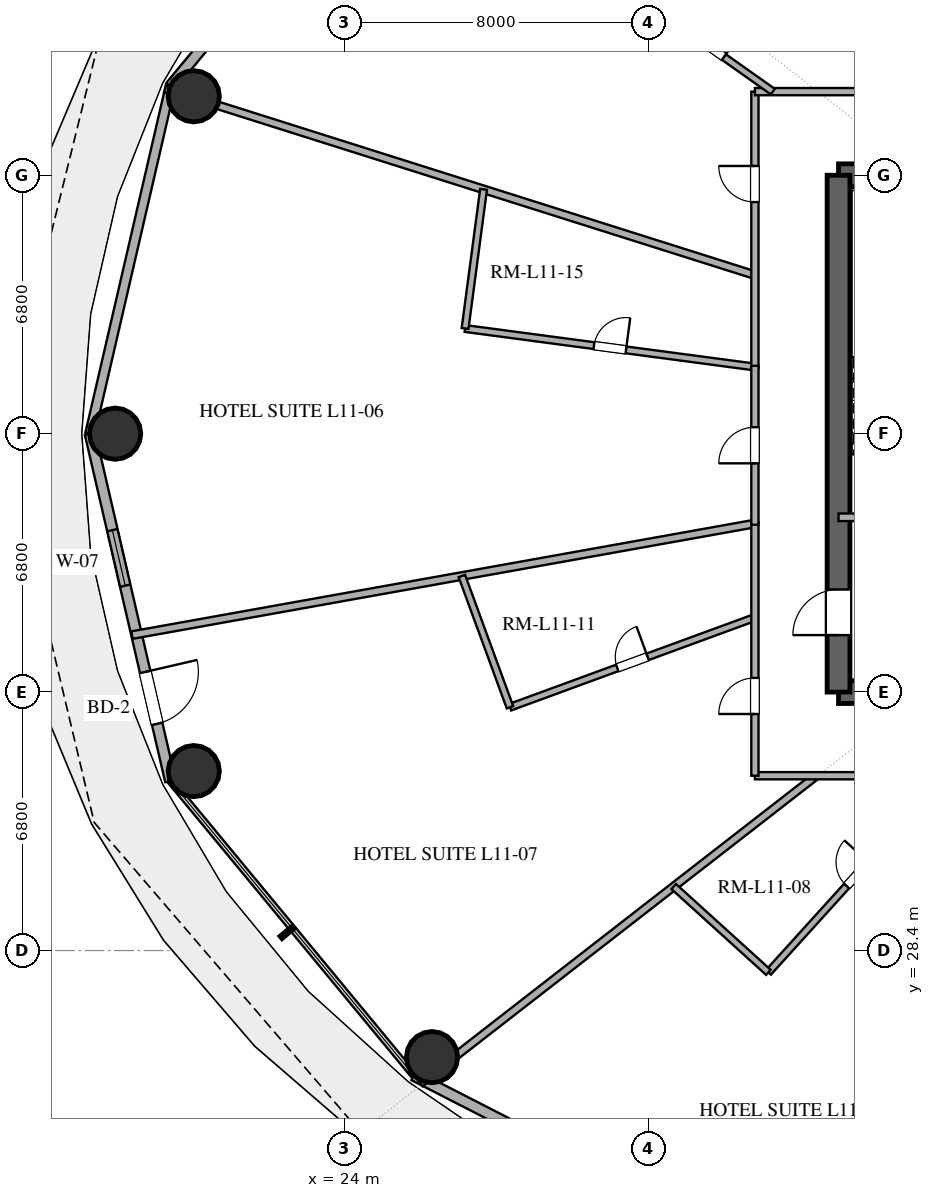
"""IFC4 building model, lengths in metres.
Left out: names, types, materials, properties, quantities, classifications, styles, units other than length and angle.
Written with IfcOpenShell. Run it as: python <this file> out.ifc"""

import sys

from ifc_helpers import new_model, si_unit, direction, frame, frame_2d, origin, origin_2d, place, context, subcontext, project, spatial, rectangle, hollow_circle, extrude, element, fill, save


model = new_model("IFC4")
c1 = context("Model", 3, precision=1e-05, world=origin(), true_north=direction((0.0, 1.0)))
c2 = subcontext(c1, "Body", "Model", "MODEL_VIEW")
j1 = project(units=[si_unit("LENGTHUNIT", "METRE"), si_unit("PLANEANGLEUNIT", "RADIAN")], contexts=[c1])
p1 = place(None, origin())
s1 = spatial("IfcSite", under=j1, at=p1, CompositionType="ELEMENT")
p2 = place(p1, origin())
s2 = spatial("IfcBuilding", under=s1, at=p2, CompositionType="ELEMENT")
p3 = place(p2, frame((0.0, 0.0, 49.8)))
s3 = spatial("IfcBuildingStorey", under=s2, at=p3, CompositionType="ELEMENT", Elevation=49.8)
for number, where, z_axis, x_axis in (
    (1, (37.0, 35.2, 0.0), (0.0, 0.0, 1.0), (1.0, 0.0, 0.0)),
    (2, (37.0, 48.8, 0.0), (0.0, 0.0, 1.0), (1.0, 0.0, 0.0)),
):
    element("IfcWall", number, at=place(p3, frame(where, z_axis=z_axis, x_axis=x_axis)), inside=s3, PredefinedType="SHEAR", context=c2, shape_type="SweptSolid", body=[
        extrude(rectangle(XDim=4.0, YDim=0.6, at=frame_2d((2.0, 0.0))), origin(), (0.0, 0.0, 1.0), 3.38),
    ])
p4 = place(p3, frame((37.0, 35.2, 0.0), z_axis=(0.0, 0.0, 1.0), x_axis=(0.0, 1.0, 0.0)))
e3 = element("IfcWall", 3, at=p4, inside=s3, PredefinedType="SHEAR", context=c2, shape_type="SweptSolid", body=[
    extrude(rectangle(XDim=13.6, YDim=0.6, at=frame_2d((6.8, 0.0))), origin(), (0.0, 0.0, 1.0), 3.38),
])
p5 = place(p4, frame((1.5, 0.0, 0.0)))
e4 = element("IfcOpeningElement", 4, at=p5, cuts=e3, PredefinedType="OPENING", context=c2, shape_type="SweptSolid", body=[
    extrude(rectangle(XDim=1.2, YDim=2.15, at=frame_2d((0.6, 1.075))), frame((0.0, 0.31, 0.0), z_axis=(0.0, -1.0, 0.0), x_axis=(1.0, 0.0, 0.0)), (0.0, 0.0, 1.0), 0.62),
])
for number, where, z_axis, x_axis in (
    (5, (20.034, 50.878, 0.0), (0.0, 0.0, 1.0), (1.0, 0.0, 0.0)),
    (6, (17.965, 42.0, 0.0), (0.0, 0.0, 1.0), (1.0, 0.0, 0.0)),
    (7, (20.034, 33.122, 0.0), (0.0, 0.0, 1.0), (1.0, 0.0, 0.0)),
    (8, (26.303, 25.595, 0.0), (0.0, 0.0, 1.0), (1.0, 0.0, 0.0)),
):
    element("IfcColumn", number, at=place(p3, frame(where, z_axis=z_axis, x_axis=x_axis)), inside=s3, PredefinedType="COLUMN", context=c2, shape_type="SweptSolid", body=[
        extrude(hollow_circle(Radius=0.675, WallThickness=0.036, at=origin_2d()), origin(), (0.0, 0.0, 1.0), 3.38),
    ])
p6 = place(p3, frame((25.826, 58.886, 0.0), z_axis=(0.0, 0.0, 1.0), x_axis=(-0.637296809613, -0.770618437657, 0.0)))
e9 = element("IfcWall", 9, at=p6, inside=s3, PredefinedType="SOLIDWALL", context=c2, shape_type="SweptSolid", body=[
    extrude(rectangle(XDim=10.053, YDim=0.28, at=frame_2d((5.027, 0.0))), origin(), (0.0, 0.0, 1.0), 3.38),
])
p7 = place(p6, frame((2.698, 0.0, 0.85)))
e10 = element("IfcOpeningElement", 10, at=p7, cuts=e9, PredefinedType="OPENING", context=c2, shape_type="SweptSolid", body=[
    extrude(rectangle(XDim=1.65, YDim=2.0, at=frame_2d((0.825, 1.0))), frame((0.0, 0.15, 0.0), z_axis=(0.0, -1.0, 0.0), x_axis=(1.0, 0.0, 0.0)), (0.0, 0.0, 1.0), 0.3),
])
p8 = place(p6, frame((5.58, 0.0, 0.85)))
e11 = element("IfcOpeningElement", 11, at=p8, cuts=e9, PredefinedType="OPENING", context=c2, shape_type="SweptSolid", body=[
    extrude(rectangle(XDim=1.65, YDim=2.0, at=frame_2d((0.825, 1.0))), frame((0.0, 0.15, 0.0), z_axis=(0.0, -1.0, 0.0), x_axis=(1.0, 0.0, 0.0)), (0.0, 0.0, 1.0), 0.3),
])
p9 = place(p3, frame((19.419, 51.138, 0.0), z_axis=(0.0, 0.0, 1.0), x_axis=(-0.225454452941, -0.974253709076, 0.0)))
e12 = element("IfcWall", 12, at=p9, inside=s3, PredefinedType="SOLIDWALL", context=c2, shape_type="SweptSolid", body=[
    extrude(rectangle(XDim=9.38, YDim=0.25, at=frame_2d((4.69, 0.0))), origin(), (0.0, 0.0, 1.0), 3.38),
])
p10 = place(p3, frame((17.304, 42.0, 0.0), z_axis=(0.0, 0.0, 1.0), x_axis=(0.225454452941, -0.974253709076, 0.0)))
e13 = element("IfcWall", 13, at=p10, inside=s3, PredefinedType="SOLIDWALL", context=c2, shape_type="SweptSolid", body=[
    extrude(rectangle(XDim=9.38, YDim=0.28, at=frame_2d((4.69, 0.0))), origin(), (0.0, 0.0, 1.0), 3.38),
])
p11 = place(p10, frame((2.606, 0.0, 0.85)))
e14 = element("IfcOpeningElement", 14, at=p11, cuts=e13, PredefinedType="OPENING", context=c2, shape_type="SweptSolid", body=[
    extrude(rectangle(XDim=1.5, YDim=1.8, at=frame_2d((0.75, 0.9))), frame((0.0, 0.15, 0.0), z_axis=(0.0, -1.0, 0.0), x_axis=(1.0, 0.0, 0.0)), (0.0, 0.0, 1.0), 0.3),
])
p12 = place(p10, frame((6.435, 0.0, 0.0)))
e15 = element("IfcOpeningElement", 15, at=p12, cuts=e13, PredefinedType="OPENING", context=c2, shape_type="SweptSolid", body=[
    extrude(rectangle(XDim=1.4, YDim=2.2, at=frame_2d((0.7, 1.1))), frame((0.0, 0.15, 0.0), z_axis=(0.0, -1.0, 0.0), x_axis=(1.0, 0.0, 0.0)), (0.0, 0.0, 1.0), 0.3),
])
p13 = place(p3, frame((25.826, 25.114, 0.0), z_axis=(0.0, 0.0, 1.0), x_axis=(0.889853976658, -0.456245438581, 0.0)))
e16 = element("IfcWall", 16, at=p13, inside=s3, PredefinedType="SOLIDWALL", context=c2, shape_type="SweptSolid", body=[
    extrude(rectangle(XDim=11.346, YDim=0.28, at=frame_2d((5.673, 0.0))), origin(), (0.0, 0.0, 1.0), 3.38),
])
p14 = place(p13, frame((3.567, 0.0, 0.85)))
e17 = element("IfcOpeningElement", 17, at=p14, cuts=e16, PredefinedType="OPENING", context=c2, shape_type="SweptSolid", body=[
    extrude(rectangle(XDim=1.2, YDim=1.8, at=frame_2d((0.6, 0.9))), frame((0.0, 0.15, 0.0), z_axis=(0.0, -1.0, 0.0), x_axis=(1.0, 0.0, 0.0)), (0.0, 0.0, 1.0), 0.3),
])
p15 = place(p13, frame((6.729, 0.0, 0.85)))
e18 = element("IfcOpeningElement", 18, at=p15, cuts=e16, PredefinedType="OPENING", context=c2, shape_type="SweptSolid", body=[
    extrude(rectangle(XDim=1.2, YDim=1.8, at=frame_2d((0.6, 0.9))), frame((0.0, 0.15, 0.0), z_axis=(0.0, -1.0, 0.0), x_axis=(1.0, 0.0, 0.0)), (0.0, 0.0, 1.0), 0.3),
])
p16 = place(p3, frame((37.0, 39.8, 0.0), z_axis=(0.0, 0.0, 1.0), x_axis=(1.0, 0.0, 0.0)))
e19 = element("IfcWall", 19, at=p16, inside=s3, PredefinedType="SOLIDWALL", context=c2, shape_type="SweptSolid", body=[
    extrude(rectangle(XDim=4.0, YDim=0.2, at=frame_2d((2.0, 0.0))), origin(), (0.0, 0.0, 1.0), 2.74),
])
p17 = place(p16, frame((1.45, 0.0, 0.0)))
e20 = element("IfcOpeningElement", 20, at=p17, cuts=e19, PredefinedType="OPENING", context=c2, shape_type="SweptSolid", body=[
    extrude(rectangle(XDim=1.1, YDim=2.15, at=frame_2d((0.55, 1.075))), frame((0.0, 0.11, 0.0), z_axis=(0.0, -1.0, 0.0), x_axis=(1.0, 0.0, 0.0)), (0.0, 0.0, 1.0), 0.22),
])
p18 = place(p3, frame((34.8, 39.636, 0.0), z_axis=(0.0, 0.0, 1.0), x_axis=(-0.984338200058, -0.176290407871, 0.0)))
e21 = element("IfcWall", 21, at=p18, inside=s3, PredefinedType="PARTITIONING", context=c2, shape_type="SweptSolid", body=[
    extrude(rectangle(XDim=16.653, YDim=0.2, at=frame_2d((8.327, 0.0))), origin(), (0.0, 0.0, 1.0), 2.74),
])
p19 = place(p3, frame((34.8, 46.172, 0.0), z_axis=(0.0, 0.0, 1.0), x_axis=(-0.953511676516, 0.301356073023, 0.0)))
e22 = element("IfcWall", 22, at=p19, inside=s3, PredefinedType="PARTITIONING", context=c2, shape_type="SweptSolid", body=[
    extrude(rectangle(XDim=16.275, YDim=0.2, at=frame_2d((8.137, 0.0))), origin(), (0.0, 0.0, 1.0), 2.74),
])
p20 = place(p3, frame((36.417, 33.0, 0.0), z_axis=(0.0, 0.0, 1.0), x_axis=(-0.789656987139, -0.613548565855, 0.0)))
e23 = element("IfcWall", 23, at=p20, inside=s3, PredefinedType="PARTITIONING", context=c2, shape_type="SweptSolid", body=[
    extrude(rectangle(XDim=13.195, YDim=0.2, at=frame_2d((6.597, 0.0))), origin(), (0.0, 0.0, 1.0), 2.74),
])
p21 = place(p3, frame((27.173, 44.768, 0.0), z_axis=(0.0, 0.0, 1.0), x_axis=(0.991283239225, -0.131748015661, 0.0)))
e24 = element("IfcWall", 24, at=p21, inside=s3, PredefinedType="PLUMBINGWALL", context=c2, shape_type="SweptSolid", body=[
    extrude(rectangle(XDim=7.694, YDim=0.18, at=frame_2d((3.847, 0.0))), origin(), (0.0, 0.0, 1.0), 2.74),
])
p22 = place(p21, frame((3.422, 0.0, 0.0)))
e25 = element("IfcOpeningElement", 25, at=p22, cuts=e24, PredefinedType="OPENING", context=c2, shape_type="SweptSolid", body=[
    extrude(rectangle(XDim=0.85, YDim=2.1, at=frame_2d((0.425, 1.05))), frame((0.0, 0.1, 0.0), z_axis=(0.0, -1.0, 0.0), x_axis=(1.0, 0.0, 0.0)), (0.0, 0.0, 1.0), 0.2),
])
p23 = place(p3, frame((39.072, 51.0, 0.0), z_axis=(0.0, 0.0, 1.0), x_axis=(-0.704257683765, 0.70994444491, 0.0)))
e26 = element("IfcWall", 26, at=p23, inside=s3, PredefinedType="PARTITIONING", context=c2, shape_type="SweptSolid", body=[
    extrude(rectangle(XDim=13.824, YDim=0.2, at=frame_2d((6.912, 0.0))), origin(), (0.0, 0.0, 1.0), 2.74),
])
p24 = place(p3, frame((35.155, 27.826, 0.0), z_axis=(0.0, 0.0, 1.0), x_axis=(0.671533822983, 0.740973902773, 0.0)))
e27 = element("IfcWall", 27, at=p24, inside=s3, PredefinedType="PLUMBINGWALL", context=c2, shape_type="SweptSolid", body=[
    extrude(rectangle(XDim=6.982, YDim=0.18, at=frame_2d((3.491, 0.0))), origin(), (0.0, 0.0, 1.0), 2.74),
])
p25 = place(p24, frame((3.066, 0.0, 0.0)))
e28 = element("IfcOpeningElement", 28, at=p25, cuts=e27, PredefinedType="OPENING", context=c2, shape_type="SweptSolid", body=[
    extrude(rectangle(XDim=0.85, YDim=2.1, at=frame_2d((0.425, 1.05))), frame((0.0, 0.1, 0.0), z_axis=(0.0, -1.0, 0.0), x_axis=(1.0, 0.0, 0.0)), (0.0, 0.0, 1.0), 0.2),
])
p26 = place(p3, frame((28.354, 34.802, 0.0), z_axis=(0.0, 0.0, 1.0), x_axis=(0.938953689431, 0.344043556986, 0.0)))
e29 = element("IfcWall", 29, at=p26, inside=s3, PredefinedType="PLUMBINGWALL", context=c2, shape_type="SweptSolid", body=[
    extrude(rectangle(XDim=6.865, YDim=0.18, at=frame_2d((3.433, 0.0))), origin(), (0.0, 0.0, 1.0), 2.74),
])
p27 = place(p26, frame((3.007, 0.0, 0.0)))
e30 = element("IfcOpeningElement", 30, at=p27, cuts=e29, PredefinedType="OPENING", context=c2, shape_type="SweptSolid", body=[
    extrude(rectangle(XDim=0.85, YDim=2.1, at=frame_2d((0.425, 1.05))), frame((0.0, 0.1, 0.0), z_axis=(0.0, -1.0, 0.0), x_axis=(1.0, 0.0, 0.0)), (0.0, 0.0, 1.0), 0.2),
])
p28 = place(p3, frame((34.8, 43.722, 0.0), z_axis=(0.0, 0.0, 1.0), x_axis=(0.0, 1.0, 0.0)))
e31 = element("IfcWall", 31, at=p28, inside=s3, PredefinedType="PARTITIONING", context=c2, shape_type="SweptSolid", body=[
    extrude(rectangle(XDim=7.278, YDim=0.19, at=frame_2d((3.639, 0.0))), origin(), (0.0, 0.0, 1.0), 2.74),
])
p29 = place(p28, frame((4.372, 0.0, 0.0)))
e32 = element("IfcOpeningElement", 32, at=p29, cuts=e31, PredefinedType="OPENING", context=c2, shape_type="SweptSolid", body=[
    extrude(rectangle(XDim=0.95, YDim=2.15, at=frame_2d((0.475, 1.075))), frame((0.0, 0.105, 0.0), z_axis=(0.0, -1.0, 0.0), x_axis=(1.0, 0.0, 0.0)), (0.0, 0.0, 1.0), 0.21),
])
p30 = place(p3, frame((50.144, 33.0, 0.0), z_axis=(0.0, 0.0, 1.0), x_axis=(-1.0, 0.0, 0.0)))
e33 = element("IfcWall", 33, at=p30, inside=s3, PredefinedType="PARTITIONING", context=c2, shape_type="SweptSolid", body=[
    extrude(rectangle(XDim=15.344, YDim=0.19, at=frame_2d((7.672, 0.0))), origin(), (0.0, 0.0, 1.0), 2.74),
])
p31 = place(p30, frame((3.438, 0.0, 0.0)))
e34 = element("IfcOpeningElement", 34, at=p31, cuts=e33, PredefinedType="OPENING", context=c2, shape_type="SweptSolid", body=[
    extrude(rectangle(XDim=1.0, YDim=2.2, at=frame_2d((0.5, 1.1))), frame((0.0, 0.105, 0.0), z_axis=(0.0, -1.0, 0.0), x_axis=(1.0, 0.0, 0.0)), (0.0, 0.0, 1.0), 0.21),
])
p32 = place(p30, frame((7.798, 0.0, 0.0)))
e35 = element("IfcOpeningElement", 35, at=p32, cuts=e33, PredefinedType="OPENING", context=c2, shape_type="SweptSolid", body=[
    extrude(rectangle(XDim=0.95, YDim=2.15, at=frame_2d((0.475, 1.075))), frame((0.0, 0.105, 0.0), z_axis=(0.0, -1.0, 0.0), x_axis=(1.0, 0.0, 0.0)), (0.0, 0.0, 1.0), 0.21),
])
p33 = place(p3, frame((34.8, 51.0, 0.0), z_axis=(0.0, 0.0, 1.0), x_axis=(1.0, 0.0, 0.0)))
e36 = element("IfcWall", 36, at=p33, inside=s3, PredefinedType="PARTITIONING", context=c2, shape_type="SweptSolid", body=[
    extrude(rectangle(XDim=8.641, YDim=0.19, at=frame_2d((4.32, 0.0))), origin(), (0.0, 0.0, 1.0), 2.74),
])
p34 = place(p33, frame((5.959, 0.0, 0.0)))
e37 = element("IfcOpeningElement", 37, at=p34, cuts=e36, PredefinedType="OPENING", context=c2, shape_type="SweptSolid", body=[
    extrude(rectangle(XDim=0.95, YDim=2.15, at=frame_2d((0.475, 1.075))), frame((0.0, 0.105, 0.0), z_axis=(0.0, -1.0, 0.0), x_axis=(1.0, 0.0, 0.0)), (0.0, 0.0, 1.0), 0.21),
])
p35 = place(p3, frame((34.8, 33.0, 0.0), z_axis=(0.0, 0.0, 1.0), x_axis=(0.0, 1.0, 0.0)))
e38 = element("IfcWall", 38, at=p35, inside=s3, PredefinedType="PARTITIONING", context=c2, shape_type="SweptSolid", body=[
    extrude(rectangle(XDim=6.668, YDim=0.19, at=frame_2d((3.334, 0.0))), origin(), (0.0, 0.0, 1.0), 2.74),
])
p36 = place(p35, frame((1.624, 0.0, 0.0)))
e39 = element("IfcOpeningElement", 39, at=p36, cuts=e38, PredefinedType="OPENING", context=c2, shape_type="SweptSolid", body=[
    extrude(rectangle(XDim=0.95, YDim=2.15, at=frame_2d((0.475, 1.075))), frame((0.0, 0.105, 0.0), z_axis=(0.0, -1.0, 0.0), x_axis=(1.0, 0.0, 0.0)), (0.0, 0.0, 1.0), 0.21),
])
p37 = place(p3, frame((34.8, 39.604, 0.0), z_axis=(0.0, 0.0, 1.0), x_axis=(0.0, 1.0, 0.0)))
e40 = element("IfcWall", 40, at=p37, inside=s3, PredefinedType="PARTITIONING", context=c2, shape_type="SweptSolid", body=[
    extrude(rectangle(XDim=4.183, YDim=0.19, at=frame_2d((2.091, 0.0))), origin(), (0.0, 0.0, 1.0), 2.74),
])
p38 = place(p37, frame((1.616, 0.0, 0.0)))
e41 = element("IfcOpeningElement", 41, at=p38, cuts=e40, PredefinedType="OPENING", context=c2, shape_type="SweptSolid", body=[
    extrude(rectangle(XDim=0.95, YDim=2.15, at=frame_2d((0.475, 1.075))), frame((0.0, 0.105, 0.0), z_axis=(0.0, -1.0, 0.0), x_axis=(1.0, 0.0, 0.0)), (0.0, 0.0, 1.0), 0.21),
])
p39 = place(p3, frame((32.005, 53.309, 0.0), z_axis=(0.0, 0.0, 1.0), x_axis=(0.816524416543, -0.577310901672, 0.0)))
e42 = element("IfcWall", 42, at=p39, inside=s3, PredefinedType="PLUMBINGWALL", context=c2, shape_type="SweptSolid", body=[
    extrude(rectangle(XDim=4.0, YDim=0.18, at=frame_2d((2.0, 0.0))), origin(), (0.0, 0.0, 1.0), 2.74),
])
p40 = place(p39, frame((1.575, 0.0, 0.0)))
e43 = element("IfcOpeningElement", 43, at=p40, cuts=e42, PredefinedType="OPENING", context=c2, shape_type="SweptSolid", body=[
    extrude(rectangle(XDim=0.85, YDim=2.1, at=frame_2d((0.425, 1.05))), frame((0.0, 0.1, 0.0), z_axis=(0.0, -1.0, 0.0), x_axis=(1.0, 0.0, 0.0)), (0.0, 0.0, 1.0), 0.2),
])
p41 = place(p3, frame((27.66, 48.428, 0.0), z_axis=(0.0, 0.0, 1.0), x_axis=(-0.131760975246, -0.991281516726, 0.0)))
e44 = element("IfcWall", 44, at=p41, inside=s3, PredefinedType="PLUMBINGWALL", context=c2, shape_type="SweptSolid", body=[
    extrude(rectangle(XDim=3.693, YDim=0.18, at=frame_2d((1.846, 0.0))), origin(), (0.0, 0.0, 1.0), 2.74),
])
p42 = place(p3, frame((27.089, 38.255, 0.0), z_axis=(0.0, 0.0, 1.0), x_axis=(0.344012760863, -0.938964972916, 0.0)))
e45 = element("IfcWall", 45, at=p42, inside=s3, PredefinedType="PLUMBINGWALL", context=c2, shape_type="SweptSolid", body=[
    extrude(rectangle(XDim=3.677, YDim=0.18, at=frame_2d((1.839, 0.0))), origin(), (0.0, 0.0, 1.0), 2.74),
])
p43 = place(p3, frame((32.664, 30.084, 0.0), z_axis=(0.0, 0.0, 1.0), x_axis=(0.740964368308, -0.67154434321, 0.0)))
e46 = element("IfcWall", 46, at=p43, inside=s3, PredefinedType="PLUMBINGWALL", context=c2, shape_type="SweptSolid", body=[
    extrude(rectangle(XDim=3.362, YDim=0.18, at=frame_2d((1.681, 0.0))), origin(), (0.0, 0.0, 1.0), 2.74),
])
p44 = place(p11, origin())
e47 = element("IfcWindow", 47, at=p44, inside=s3, PartitioningType="SINGLE_PANEL", PredefinedType="WINDOW", context=c2, shape_type="SweptSolid", body=[
    extrude(rectangle(XDim=1.5, YDim=1.8, at=frame_2d((0.75, 0.9))), frame((0.0, 0.03, 0.0), z_axis=(0.0, -1.0, 0.0), x_axis=(1.0, 0.0, 0.0)), (0.0, 0.0, 1.0), 0.06),
])
fill(e14, e47)
p45 = place(p12, origin())
e48 = element("IfcDoor", 48, at=p45, inside=s3, OperationType="SINGLE_SWING_LEFT", PredefinedType="DOOR", context=c2, shape_type="SweptSolid", body=[
    extrude(rectangle(XDim=1.4, YDim=2.2, at=frame_2d((0.7, 1.1))), frame((0.0, 0.025, 0.0), z_axis=(0.0, -1.0, 0.0), x_axis=(1.0, 0.0, 0.0)), (0.0, 0.0, 1.0), 0.05),
])
fill(e15, e48)
p46 = place(p5, origin())
e49 = element("IfcDoor", 49, at=p46, inside=s3, OperationType="SINGLE_SWING_LEFT", PredefinedType="DOOR", context=c2, shape_type="SweptSolid", body=[
    extrude(rectangle(XDim=1.2, YDim=2.15, at=frame_2d((0.6, 1.075))), frame((0.0, 0.025, 0.0), z_axis=(0.0, -1.0, 0.0), x_axis=(1.0, 0.0, 0.0)), (0.0, 0.0, 1.0), 0.05),
])
fill(e4, e49)
p47 = place(p22, origin())
e50 = element("IfcDoor", 50, at=p47, inside=s3, OperationType="SINGLE_SWING_RIGHT", PredefinedType="DOOR", context=c2, shape_type="SweptSolid", body=[
    extrude(rectangle(XDim=0.85, YDim=2.1, at=frame_2d((0.425, 1.05))), frame((0.0, 0.025, 0.0), z_axis=(0.0, -1.0, 0.0), x_axis=(1.0, 0.0, 0.0)), (0.0, 0.0, 1.0), 0.05),
])
fill(e25, e50)
p48 = place(p25, origin())
e51 = element("IfcDoor", 51, at=p48, inside=s3, OperationType="SINGLE_SWING_RIGHT", PredefinedType="DOOR", context=c2, shape_type="SweptSolid", body=[
    extrude(rectangle(XDim=0.85, YDim=2.1, at=frame_2d((0.425, 1.05))), frame((0.0, 0.025, 0.0), z_axis=(0.0, -1.0, 0.0), x_axis=(1.0, 0.0, 0.0)), (0.0, 0.0, 1.0), 0.05),
])
fill(e28, e51)
p49 = place(p27, origin())
e52 = element("IfcDoor", 52, at=p49, inside=s3, OperationType="SINGLE_SWING_RIGHT", PredefinedType="DOOR", context=c2, shape_type="SweptSolid", body=[
    extrude(rectangle(XDim=0.85, YDim=2.1, at=frame_2d((0.425, 1.05))), frame((0.0, 0.025, 0.0), z_axis=(0.0, -1.0, 0.0), x_axis=(1.0, 0.0, 0.0)), (0.0, 0.0, 1.0), 0.05),
])
fill(e30, e52)
p50 = place(p29, origin())
e53 = element("IfcDoor", 53, at=p50, inside=s3, OperationType="SINGLE_SWING_RIGHT", PredefinedType="DOOR", context=c2, shape_type="SweptSolid", body=[
    extrude(rectangle(XDim=0.95, YDim=2.15, at=frame_2d((0.475, 1.075))), frame((0.0, 0.025, 0.0), z_axis=(0.0, -1.0, 0.0), x_axis=(1.0, 0.0, 0.0)), (0.0, 0.0, 1.0), 0.05),
])
fill(e32, e53)
p51 = place(p36, origin())
e54 = element("IfcDoor", 54, at=p51, inside=s3, OperationType="SINGLE_SWING_LEFT", PredefinedType="DOOR", context=c2, shape_type="SweptSolid", body=[
    extrude(rectangle(XDim=0.95, YDim=2.15, at=frame_2d((0.475, 1.075))), frame((0.0, 0.025, 0.0), z_axis=(0.0, -1.0, 0.0), x_axis=(1.0, 0.0, 0.0)), (0.0, 0.0, 1.0), 0.05),
])
fill(e39, e54)
p52 = place(p38, origin())
e55 = element("IfcDoor", 55, at=p52, inside=s3, OperationType="SINGLE_SWING_LEFT", PredefinedType="DOOR", context=c2, shape_type="SweptSolid", body=[
    extrude(rectangle(XDim=0.95, YDim=2.15, at=frame_2d((0.475, 1.075))), frame((0.0, 0.025, 0.0), z_axis=(0.0, -1.0, 0.0), x_axis=(1.0, 0.0, 0.0)), (0.0, 0.0, 1.0), 0.05),
])
fill(e41, e55)
p53 = place(p40, origin())
e56 = element("IfcDoor", 56, at=p53, inside=s3, OperationType="SINGLE_SWING_RIGHT", PredefinedType="DOOR", context=c2, shape_type="SweptSolid", body=[
    extrude(rectangle(XDim=0.85, YDim=2.1, at=frame_2d((0.425, 1.05))), frame((0.0, 0.025, 0.0), z_axis=(0.0, -1.0, 0.0), x_axis=(1.0, 0.0, 0.0)), (0.0, 0.0, 1.0), 0.05),
])
fill(e43, e56)
save(model, sys.argv[1])
